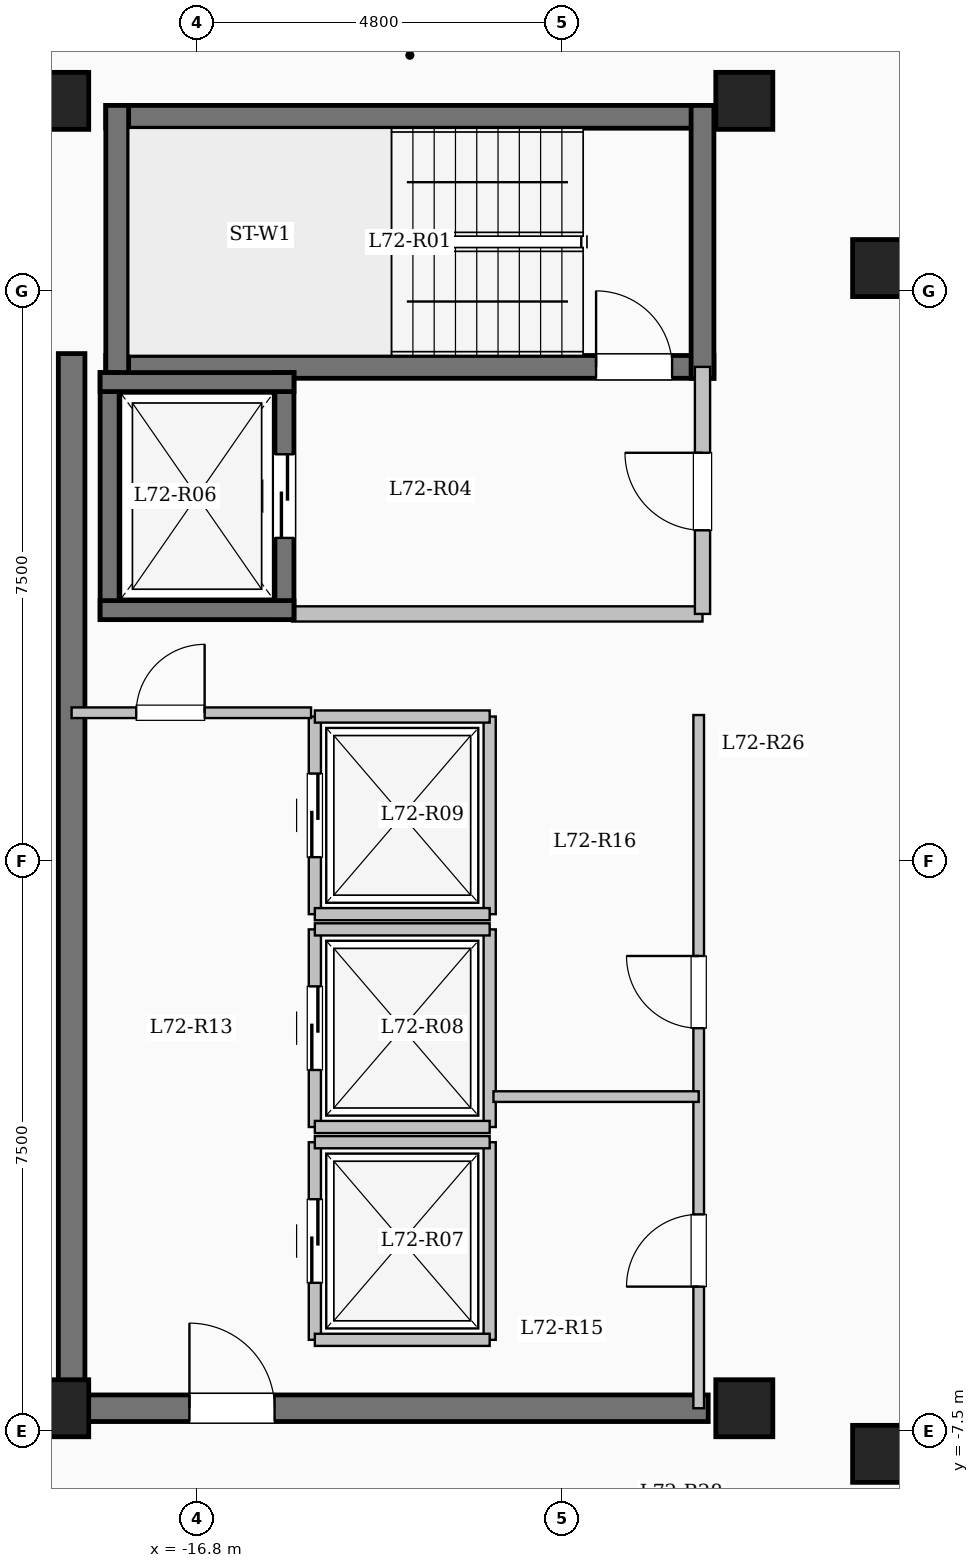
"""IFC4 building model, lengths in metres.
Left out: names, types, materials, properties, quantities, classifications, styles, units other than length and angle.
Written with IfcOpenShell. Run it as: python <this file> out.ifc"""

import sys

from ifc_helpers import new_model, si_unit, direction, frame, frame_2d, origin, origin_2d, place, context, subcontext, project, spatial, rectangle, extrude, element, fill, save


model = new_model("IFC4")
c1 = context("Model", 3, precision=1e-05, world=origin(), true_north=direction((0.0, 1.0)))
c2 = subcontext(c1, "Body", "Model", "MODEL_VIEW")
j1 = project(units=[si_unit("LENGTHUNIT", "METRE"), si_unit("PLANEANGLEUNIT", "RADIAN")], contexts=[c1])
p1 = place(None, origin())
s1 = spatial("IfcSite", under=j1, at=p1, CompositionType="ELEMENT")
p2 = place(p1, origin())
s2 = spatial("IfcBuilding", under=s1, at=p2, CompositionType="ELEMENT")
p3 = place(p2, frame((0.0, 0.0, 264.95)))
s3 = spatial("IfcBuildingStorey", under=s2, at=p3, CompositionType="ELEMENT", Elevation=264.95)
for number, where, z_axis, x_axis in (
    (1, (-7.8, -7.8, 0.0), (0.0, 0.0, 1.0), (1.0, 0.0, 0.0)),
    (2, (-7.8, 7.8, 0.0), (0.0, 0.0, 1.0), (1.0, 0.0, 0.0)),
    (3, (-9.6, -7.2, 0.0), (0.0, 0.0, 1.0), (1.0, 0.0, 0.0)),
    (4, (-9.6, 10.0, 0.0), (0.0, 0.0, 1.0), (1.0, 0.0, 0.0)),
    (5, (-18.6, -7.2, 0.0), (0.0, 0.0, 1.0), (1.0, 0.0, 0.0)),
    (6, (-18.6, 10.0, 0.0), (0.0, 0.0, 1.0), (1.0, 0.0, 0.0)),
):
    element("IfcColumn", number, at=place(p3, frame(where, z_axis=z_axis, x_axis=x_axis)), inside=s3, PredefinedType="COLUMN", context=c2, shape_type="SweptSolid", body=[
        extrude(rectangle(XDim=0.75, YDim=0.75, at=origin_2d()), origin(), (0.0, 0.0, 1.0), 3.35),
    ])
p4 = place(p3, frame((-18.0, 9.79, 0.0), z_axis=(0.0, 0.0, 1.0), x_axis=(1.0, 0.0, 0.0)))
e7 = element("IfcWall", 7, at=p4, inside=s3, PredefinedType="SHEAR", context=c2, shape_type="SweptSolid", body=[
    extrude(rectangle(XDim=8.0, YDim=0.3, at=frame_2d((4.0, 0.0))), origin(), (0.0, 0.0, 1.0), 3.35),
])
p5 = place(p3, frame((-18.0, 6.5, 0.0), z_axis=(0.0, 0.0, 1.0), x_axis=(1.0, 0.0, 0.0)))
e8 = element("IfcWall", 8, at=p5, inside=s3, PredefinedType="SHEAR", context=c2, shape_type="SweptSolid", body=[
    extrude(rectangle(XDim=8.0, YDim=0.3, at=frame_2d((4.0, 0.0))), origin(), (0.0, 0.0, 1.0), 3.35),
])
p6 = place(p5, frame((6.45, 0.0, 0.0)))
e9 = element("IfcOpeningElement", 9, at=p6, cuts=e8, PredefinedType="OPENING", context=c2, shape_type="SweptSolid", body=[
    extrude(rectangle(XDim=1.0, YDim=2.15, at=frame_2d((0.5, 1.075))), frame((0.0, 0.16, 0.0), z_axis=(0.0, -1.0, 0.0), x_axis=(1.0, 0.0, 0.0)), (0.0, 0.0, 1.0), 0.32),
])
for number, where, z_axis, x_axis in (
    (10, (-17.85, 6.35, 0.0), (0.0, 0.0, 1.0), (0.0, 1.0, 0.0)),
    (11, (-10.15, 6.35, 0.0), (0.0, 0.0, 1.0), (0.0, 1.0, 0.0)),
):
    element("IfcWall", number, at=place(p3, frame(where, z_axis=z_axis, x_axis=x_axis)), inside=s3, PredefinedType="SHEAR", context=c2, shape_type="SweptSolid", body=[
        extrude(rectangle(XDim=3.59, YDim=0.3, at=frame_2d((1.795, 0.0))), origin(), (0.0, 0.0, 1.0), 3.35),
    ])
p7 = place(p3, frame((-15.55, 3.25, 0.0), z_axis=(0.0, 0.0, 1.0), x_axis=(1.0, 0.0, 0.0)))
e12 = element("IfcWall", 12, at=p7, inside=s3, PredefinedType="SOLIDWALL", context=c2, shape_type="SweptSolid", body=[
    extrude(rectangle(XDim=5.4, YDim=0.2, at=frame_2d((2.7, 0.0))), origin(), (0.0, 0.0, 1.0), 3.1),
])
p8 = place(p3, frame((-10.15, 3.25, 0.0), z_axis=(0.0, 0.0, 1.0), x_axis=(0.0, 1.0, 0.0)))
e13 = element("IfcWall", 13, at=p8, inside=s3, PredefinedType="SOLIDWALL", context=c2, shape_type="SweptSolid", body=[
    extrude(rectangle(XDim=3.25, YDim=0.2, at=frame_2d((1.625, 0.0))), origin(), (0.0, 0.0, 1.0), 3.1),
])
p9 = place(p8, frame((1.1, 0.0, 0.0)))
e14 = element("IfcOpeningElement", 14, at=p9, cuts=e13, PredefinedType="OPENING", context=c2, shape_type="SweptSolid", body=[
    extrude(rectangle(XDim=1.02, YDim=2.15, at=frame_2d((0.51, 1.075))), frame((0.0, 0.11, 0.0), z_axis=(0.0, -1.0, 0.0), x_axis=(1.0, 0.0, 0.0)), (0.0, 0.0, 1.0), 0.22),
])
p10 = place(p3, frame((-17.95, 3.175, 0.0), z_axis=(0.0, 0.0, 1.0), x_axis=(0.0, 1.0, 0.0)))
e15 = element("IfcWall", 15, at=p10, inside=s3, PredefinedType="SHEAR", context=c2, shape_type="SweptSolid", body=[
    extrude(rectangle(XDim=3.25, YDim=0.25, at=frame_2d((1.625, 0.0))), origin(), (0.0, 0.0, 1.0), 3.35),
])
p11 = place(p3, frame((-15.65, 3.175, 0.0), z_axis=(0.0, 0.0, 1.0), x_axis=(0.0, 1.0, 0.0)))
e16 = element("IfcWall", 16, at=p11, inside=s3, PredefinedType="SHEAR", context=c2, shape_type="SweptSolid", body=[
    extrude(rectangle(XDim=3.25, YDim=0.25, at=frame_2d((1.625, 0.0))), origin(), (0.0, 0.0, 1.0), 3.35),
])
p12 = place(p11, frame((1.075, 0.0, 0.0)))
e17 = element("IfcOpeningElement", 17, at=p12, cuts=e16, PredefinedType="OPENING", context=c2, shape_type="SweptSolid", body=[
    extrude(rectangle(XDim=1.1, YDim=2.15, at=frame_2d((0.55, 1.075))), frame((0.0, 0.135, 0.0), z_axis=(0.0, -1.0, 0.0), x_axis=(1.0, 0.0, 0.0)), (0.0, 0.0, 1.0), 0.27),
])
for number, where, z_axis, x_axis in (
    (18, (-18.075, 3.3, 0.0), (0.0, 0.0, 1.0), (1.0, 0.0, 0.0)),
    (19, (-18.075, 6.3, 0.0), (0.0, 0.0, 1.0), (1.0, 0.0, 0.0)),
):
    element("IfcWall", number, at=place(p3, frame(where, z_axis=z_axis, x_axis=x_axis)), inside=s3, PredefinedType="SHEAR", context=c2, shape_type="SweptSolid", body=[
        extrude(rectangle(XDim=2.55, YDim=0.25, at=frame_2d((1.275, 0.0))), origin(), (0.0, 0.0, 1.0), 3.35),
    ])
p13 = place(p3, frame((-15.25, -6.3, 0.0), z_axis=(0.0, 0.0, 1.0), x_axis=(0.0, 1.0, 0.0)))
e20 = element("IfcWall", 20, at=p13, inside=s3, PredefinedType="SOLIDWALL", context=c2, shape_type="SweptSolid", body=[
    extrude(rectangle(XDim=2.6, YDim=0.16, at=frame_2d((1.3, 0.0))), origin(), (0.0, 0.0, 1.0), 3.1),
])
p14 = place(p13, frame((0.75, 0.0, 0.0)))
e21 = element("IfcOpeningElement", 21, at=p14, cuts=e20, PredefinedType="OPENING", context=c2, shape_type="SweptSolid", body=[
    extrude(rectangle(XDim=1.1, YDim=2.15, at=frame_2d((0.55, 1.075))), frame((0.0, 0.09, 0.0), z_axis=(0.0, -1.0, 0.0), x_axis=(1.0, 0.0, 0.0)), (0.0, 0.0, 1.0), 0.18),
])
p15 = place(p3, frame((-12.95, -6.3, 0.0), z_axis=(0.0, 0.0, 1.0), x_axis=(0.0, 1.0, 0.0)))
e22 = element("IfcWall", 22, at=p15, inside=s3, PredefinedType="SOLIDWALL", context=c2, shape_type="SweptSolid", body=[
    extrude(rectangle(XDim=2.6, YDim=0.16, at=frame_2d((1.3, 0.0))), origin(), (0.0, 0.0, 1.0), 3.1),
])
for number, where, z_axis, x_axis in (
    (23, (-15.25, -6.3, 0.0), (0.0, 0.0, 1.0), (1.0, 0.0, 0.0)),
    (24, (-15.25, -3.7, 0.0), (0.0, 0.0, 1.0), (1.0, 0.0, 0.0)),
):
    element("IfcWall", number, at=place(p3, frame(where, z_axis=z_axis, x_axis=x_axis)), inside=s3, PredefinedType="SOLIDWALL", context=c2, shape_type="SweptSolid", body=[
        extrude(rectangle(XDim=2.3, YDim=0.16, at=frame_2d((1.15, 0.0))), origin(), (0.0, 0.0, 1.0), 3.1),
    ])
p16 = place(p3, frame((-15.25, -3.5, 0.0), z_axis=(0.0, 0.0, 1.0), x_axis=(0.0, 1.0, 0.0)))
e25 = element("IfcWall", 25, at=p16, inside=s3, PredefinedType="SOLIDWALL", context=c2, shape_type="SweptSolid", body=[
    extrude(rectangle(XDim=2.6, YDim=0.16, at=frame_2d((1.3, 0.0))), origin(), (0.0, 0.0, 1.0), 3.1),
])
p17 = place(p16, frame((0.75, 0.0, 0.0)))
e26 = element("IfcOpeningElement", 26, at=p17, cuts=e25, PredefinedType="OPENING", context=c2, shape_type="SweptSolid", body=[
    extrude(rectangle(XDim=1.1, YDim=2.15, at=frame_2d((0.55, 1.075))), frame((0.0, 0.09, 0.0), z_axis=(0.0, -1.0, 0.0), x_axis=(1.0, 0.0, 0.0)), (0.0, 0.0, 1.0), 0.18),
])
p18 = place(p3, frame((-12.95, -3.5, 0.0), z_axis=(0.0, 0.0, 1.0), x_axis=(0.0, 1.0, 0.0)))
e27 = element("IfcWall", 27, at=p18, inside=s3, PredefinedType="SOLIDWALL", context=c2, shape_type="SweptSolid", body=[
    extrude(rectangle(XDim=2.6, YDim=0.16, at=frame_2d((1.3, 0.0))), origin(), (0.0, 0.0, 1.0), 3.1),
])
for number, where, z_axis, x_axis in (
    (28, (-15.25, -3.5, 0.0), (0.0, 0.0, 1.0), (1.0, 0.0, 0.0)),
    (29, (-15.25, -0.9, 0.0), (0.0, 0.0, 1.0), (1.0, 0.0, 0.0)),
):
    element("IfcWall", number, at=place(p3, frame(where, z_axis=z_axis, x_axis=x_axis)), inside=s3, PredefinedType="SOLIDWALL", context=c2, shape_type="SweptSolid", body=[
        extrude(rectangle(XDim=2.3, YDim=0.16, at=frame_2d((1.15, 0.0))), origin(), (0.0, 0.0, 1.0), 3.1),
    ])
p19 = place(p3, frame((-15.25, -0.7, 0.0), z_axis=(0.0, 0.0, 1.0), x_axis=(0.0, 1.0, 0.0)))
e30 = element("IfcWall", 30, at=p19, inside=s3, PredefinedType="SOLIDWALL", context=c2, shape_type="SweptSolid", body=[
    extrude(rectangle(XDim=2.6, YDim=0.16, at=frame_2d((1.3, 0.0))), origin(), (0.0, 0.0, 1.0), 3.1),
])
p20 = place(p19, frame((0.75, 0.0, 0.0)))
e31 = element("IfcOpeningElement", 31, at=p20, cuts=e30, PredefinedType="OPENING", context=c2, shape_type="SweptSolid", body=[
    extrude(rectangle(XDim=1.1, YDim=2.15, at=frame_2d((0.55, 1.075))), frame((0.0, 0.09, 0.0), z_axis=(0.0, -1.0, 0.0), x_axis=(1.0, 0.0, 0.0)), (0.0, 0.0, 1.0), 0.18),
])
p21 = place(p3, frame((-12.95, -0.7, 0.0), z_axis=(0.0, 0.0, 1.0), x_axis=(0.0, 1.0, 0.0)))
e32 = element("IfcWall", 32, at=p21, inside=s3, PredefinedType="SOLIDWALL", context=c2, shape_type="SweptSolid", body=[
    extrude(rectangle(XDim=2.6, YDim=0.16, at=frame_2d((1.3, 0.0))), origin(), (0.0, 0.0, 1.0), 3.1),
])
for number, where, z_axis, x_axis in (
    (33, (-15.25, -0.7, 0.0), (0.0, 0.0, 1.0), (1.0, 0.0, 0.0)),
    (34, (-15.25, 1.9, 0.0), (0.0, 0.0, 1.0), (1.0, 0.0, 0.0)),
):
    element("IfcWall", number, at=place(p3, frame(where, z_axis=z_axis, x_axis=x_axis)), inside=s3, PredefinedType="SOLIDWALL", context=c2, shape_type="SweptSolid", body=[
        extrude(rectangle(XDim=2.3, YDim=0.16, at=frame_2d((1.15, 0.0))), origin(), (0.0, 0.0, 1.0), 3.1),
    ])
p22 = place(p3, frame((-18.45, -7.375, 0.0), z_axis=(0.0, 0.0, 1.0), x_axis=(0.0, 1.0, 0.0)))
e35 = element("IfcWall", 35, at=p22, inside=s3, PredefinedType="SHEAR", context=c2, shape_type="SweptSolid", body=[
    extrude(rectangle(XDim=14.05, YDim=0.35, at=frame_2d((7.025, 0.0))), origin(), (0.0, 0.0, 1.0), 3.35),
])
p23 = place(p3, frame((-18.625, -7.2, 0.0), z_axis=(0.0, 0.0, 1.0), x_axis=(1.0, 0.0, 0.0)))
e36 = element("IfcWall", 36, at=p23, inside=s3, PredefinedType="SHEAR", context=c2, shape_type="SweptSolid", body=[
    extrude(rectangle(XDim=8.55, YDim=0.35, at=frame_2d((4.275, 0.0))), origin(), (0.0, 0.0, 1.0), 3.35),
])
p24 = place(p23, frame((1.725, 0.0, 0.0)))
e37 = element("IfcOpeningElement", 37, at=p24, cuts=e36, PredefinedType="OPENING", context=c2, shape_type="SweptSolid", body=[
    extrude(rectangle(XDim=1.12, YDim=2.15, at=frame_2d((0.56, 1.075))), frame((0.0, 0.185, 0.0), z_axis=(0.0, -1.0, 0.0), x_axis=(1.0, 0.0, 0.0)), (0.0, 0.0, 1.0), 0.37),
])
p25 = place(p3, frame((-18.45, 1.95, 0.0), z_axis=(0.0, 0.0, 1.0), x_axis=(1.0, 0.0, 0.0)))
e38 = element("IfcWall", 38, at=p25, inside=s3, PredefinedType="PARTITIONING", context=c2, shape_type="SweptSolid", body=[
    extrude(rectangle(XDim=3.15, YDim=0.14, at=frame_2d((1.575, 0.0))), origin(), (0.0, 0.0, 1.0), 3.1),
])
p26 = place(p25, frame((0.85, 0.0, 0.0)))
e39 = element("IfcOpeningElement", 39, at=p26, cuts=e38, PredefinedType="OPENING", context=c2, shape_type="SweptSolid", body=[
    extrude(rectangle(XDim=0.9, YDim=2.08, at=frame_2d((0.45, 1.04))), frame((0.0, 0.08, 0.0), z_axis=(0.0, -1.0, 0.0), x_axis=(1.0, 0.0, 0.0)), (0.0, 0.0, 1.0), 0.16),
])
p27 = place(p3, frame((-10.2, -7.2, 0.0), z_axis=(0.0, 0.0, 1.0), x_axis=(0.0, 1.0, 0.0)))
e40 = element("IfcWall", 40, at=p27, inside=s3, PredefinedType="PARTITIONING", context=c2, shape_type="SweptSolid", body=[
    extrude(rectangle(XDim=9.12, YDim=0.14, at=frame_2d((4.56, 0.0))), origin(), (0.0, 0.0, 1.0), 3.1),
])
p28 = place(p27, frame((1.6, 0.0, 0.0)))
e41 = element("IfcOpeningElement", 41, at=p28, cuts=e40, PredefinedType="OPENING", context=c2, shape_type="SweptSolid", body=[
    extrude(rectangle(XDim=0.95, YDim=2.12, at=frame_2d((0.475, 1.06))), frame((0.0, 0.08, 0.0), z_axis=(0.0, -1.0, 0.0), x_axis=(1.0, 0.0, 0.0)), (0.0, 0.0, 1.0), 0.16),
])
p29 = place(p27, frame((5.0, 0.0, 0.0)))
e42 = element("IfcOpeningElement", 42, at=p29, cuts=e40, PredefinedType="OPENING", context=c2, shape_type="SweptSolid", body=[
    extrude(rectangle(XDim=0.95, YDim=2.12, at=frame_2d((0.475, 1.06))), frame((0.0, 0.08, 0.0), z_axis=(0.0, -1.0, 0.0), x_axis=(1.0, 0.0, 0.0)), (0.0, 0.0, 1.0), 0.16),
])
p30 = place(p3, frame((-12.9, -3.1, 0.0), z_axis=(0.0, 0.0, 1.0), x_axis=(1.0, 0.0, 0.0)))
e43 = element("IfcWall", 43, at=p30, inside=s3, PredefinedType="PARTITIONING", context=c2, shape_type="SweptSolid", body=[
    extrude(rectangle(XDim=2.7, YDim=0.14, at=frame_2d((1.35, 0.0))), origin(), (0.0, 0.0, 1.0), 3.1),
])
p31 = place(p3, frame((-22.68, -7.25, 0.0), z_axis=(0.0, 0.0, 1.0), x_axis=(1.0, 0.0, 0.0)))
e44 = element("IfcWall", 44, at=p31, inside=s3, PredefinedType="PARTITIONING", context=c2, shape_type="SweptSolid", body=[
    extrude(rectangle(XDim=4.23, YDim=0.15, at=frame_2d((2.115, 0.0))), origin(), (0.0, 0.0, 1.0), 3.1),
])
p32 = place(p31, frame((1.63, 0.0, 0.0)))
e45 = element("IfcOpeningElement", 45, at=p32, cuts=e44, PredefinedType="OPENING", context=c2, shape_type="SweptSolid", body=[
    extrude(rectangle(XDim=1.08, YDim=2.15, at=frame_2d((0.54, 1.075))), frame((0.0, 0.085, 0.0), z_axis=(0.0, -1.0, 0.0), x_axis=(1.0, 0.0, 0.0)), (0.0, 0.0, 1.0), 0.17),
])
p33 = place(p6, origin())
e46 = element("IfcDoor", 46, at=p33, inside=s3, OperationType="SINGLE_SWING_LEFT", PredefinedType="DOOR", context=c2, shape_type="SweptSolid", body=[
    extrude(rectangle(XDim=1.0, YDim=2.15, at=frame_2d((0.5, 1.075))), frame((0.0, 0.025, 0.0), z_axis=(0.0, -1.0, 0.0), x_axis=(1.0, 0.0, 0.0)), (0.0, 0.0, 1.0), 0.05),
])
fill(e9, e46)
p34 = place(p9, origin())
e47 = element("IfcDoor", 47, at=p34, inside=s3, OperationType="SINGLE_SWING_RIGHT", PredefinedType="DOOR", context=c2, shape_type="SweptSolid", body=[
    extrude(rectangle(XDim=1.02, YDim=2.15, at=frame_2d((0.51, 1.075))), frame((0.0, 0.025, 0.0), z_axis=(0.0, -1.0, 0.0), x_axis=(1.0, 0.0, 0.0)), (0.0, 0.0, 1.0), 0.05),
])
fill(e14, e47)
p35 = place(p12, origin())
e48 = element("IfcDoor", 48, at=p35, inside=s3, OperationType="SLIDING_TO_LEFT", PredefinedType="DOOR", context=c2, shape_type="SweptSolid", body=[
    extrude(rectangle(XDim=1.1, YDim=2.15, at=frame_2d((0.55, 1.075))), frame((0.0, 0.025, 0.0), z_axis=(0.0, -1.0, 0.0), x_axis=(1.0, 0.0, 0.0)), (0.0, 0.0, 1.0), 0.05),
])
fill(e17, e48)
p36 = place(p14, origin())
e49 = element("IfcDoor", 49, at=p36, inside=s3, OperationType="SLIDING_TO_LEFT", PredefinedType="DOOR", context=c2, shape_type="SweptSolid", body=[
    extrude(rectangle(XDim=1.1, YDim=2.15, at=frame_2d((0.55, 1.075))), frame((0.0, 0.025, 0.0), z_axis=(0.0, -1.0, 0.0), x_axis=(1.0, 0.0, 0.0)), (0.0, 0.0, 1.0), 0.05),
])
fill(e21, e49)
p37 = place(p17, origin())
e50 = element("IfcDoor", 50, at=p37, inside=s3, OperationType="SLIDING_TO_LEFT", PredefinedType="DOOR", context=c2, shape_type="SweptSolid", body=[
    extrude(rectangle(XDim=1.1, YDim=2.15, at=frame_2d((0.55, 1.075))), frame((0.0, 0.025, 0.0), z_axis=(0.0, -1.0, 0.0), x_axis=(1.0, 0.0, 0.0)), (0.0, 0.0, 1.0), 0.05),
])
fill(e26, e50)
p38 = place(p20, origin())
e51 = element("IfcDoor", 51, at=p38, inside=s3, OperationType="SLIDING_TO_LEFT", PredefinedType="DOOR", context=c2, shape_type="SweptSolid", body=[
    extrude(rectangle(XDim=1.1, YDim=2.15, at=frame_2d((0.55, 1.075))), frame((0.0, 0.025, 0.0), z_axis=(0.0, -1.0, 0.0), x_axis=(1.0, 0.0, 0.0)), (0.0, 0.0, 1.0), 0.05),
])
fill(e31, e51)
p39 = place(p24, origin())
e52 = element("IfcDoor", 52, at=p39, inside=s3, OperationType="SINGLE_SWING_LEFT", PredefinedType="DOOR", context=c2, shape_type="SweptSolid", body=[
    extrude(rectangle(XDim=1.12, YDim=2.15, at=frame_2d((0.56, 1.075))), frame((0.0, 0.025, 0.0), z_axis=(0.0, -1.0, 0.0), x_axis=(1.0, 0.0, 0.0)), (0.0, 0.0, 1.0), 0.05),
])
fill(e37, e52)
p40 = place(p26, origin())
e53 = element("IfcDoor", 53, at=p40, inside=s3, OperationType="SINGLE_SWING_RIGHT", PredefinedType="DOOR", context=c2, shape_type="SweptSolid", body=[
    extrude(rectangle(XDim=0.9, YDim=2.08, at=frame_2d((0.45, 1.04))), frame((0.0, 0.025, 0.0), z_axis=(0.0, -1.0, 0.0), x_axis=(1.0, 0.0, 0.0)), (0.0, 0.0, 1.0), 0.05),
])
fill(e39, e53)
p41 = place(p28, origin())
e54 = element("IfcDoor", 54, at=p41, inside=s3, OperationType="SINGLE_SWING_LEFT", PredefinedType="DOOR", context=c2, shape_type="SweptSolid", body=[
    extrude(rectangle(XDim=0.95, YDim=2.12, at=frame_2d((0.475, 1.06))), frame((0.0, 0.025, 0.0), z_axis=(0.0, -1.0, 0.0), x_axis=(1.0, 0.0, 0.0)), (0.0, 0.0, 1.0), 0.05),
])
fill(e41, e54)
p42 = place(p29, origin())
e55 = element("IfcDoor", 55, at=p42, inside=s3, OperationType="SINGLE_SWING_RIGHT", PredefinedType="DOOR", context=c2, shape_type="SweptSolid", body=[
    extrude(rectangle(XDim=0.95, YDim=2.12, at=frame_2d((0.475, 1.06))), frame((0.0, 0.025, 0.0), z_axis=(0.0, -1.0, 0.0), x_axis=(1.0, 0.0, 0.0)), (0.0, 0.0, 1.0), 0.05),
])
fill(e42, e55)
save(model, sys.argv[1])
